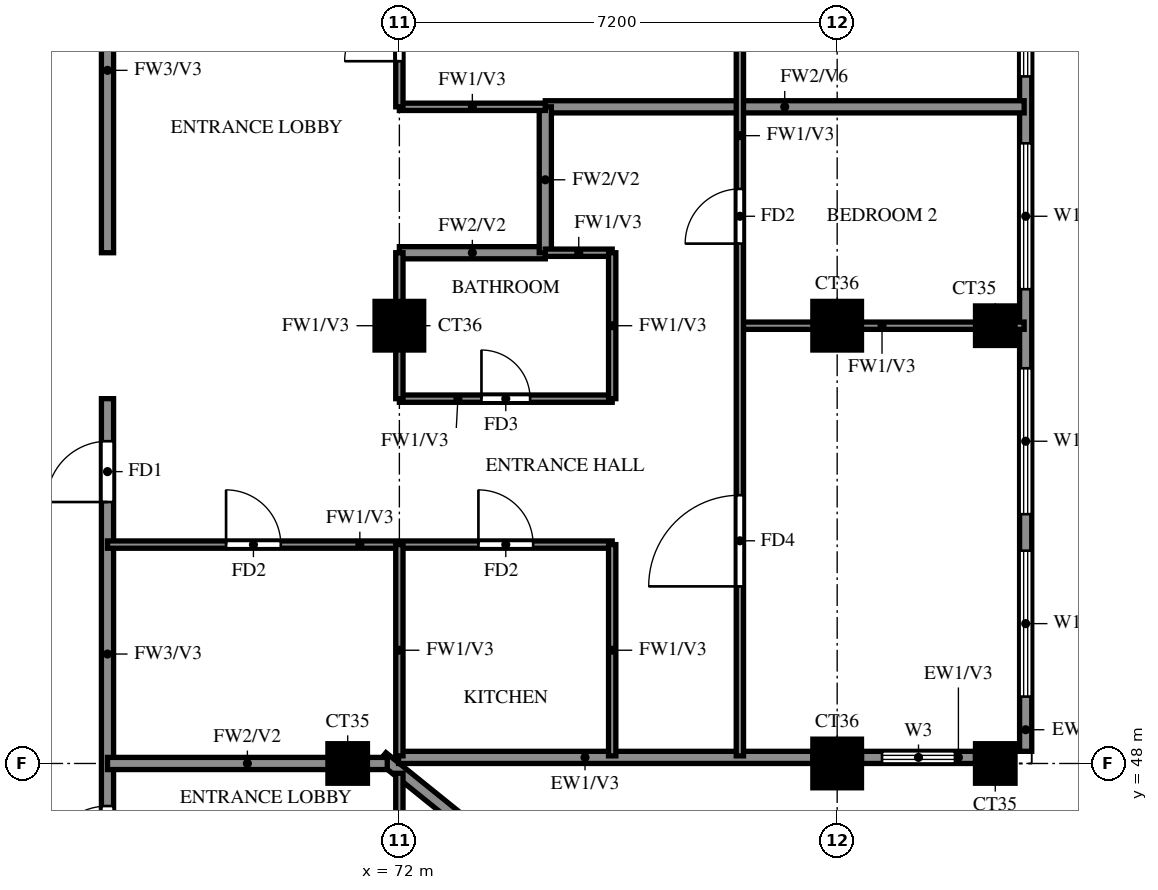
"""IFC4 building model, lengths in metres.
Left out: names, types, materials, properties, quantities, classifications, styles, units other than length and angle.
Written with IfcOpenShell. Run it as: python <this file> out.ifc"""

import sys

from ifc_helpers import new_model, si_unit, direction, frame, frame_2d, origin, origin_2d, place, context, subcontext, project, spatial, rectangle, extrude, source, transform, mapped, element, fill, save


model = new_model("IFC4")
c1 = context("Model", 3, precision=1e-05, world=origin(), true_north=direction((0.0, 1.0)))
c2 = subcontext(c1, "Body", "Model", "MODEL_VIEW")
j1 = project(units=[si_unit("LENGTHUNIT", "METRE"), si_unit("PLANEANGLEUNIT", "RADIAN")], contexts=[c1])
p1 = place(None, origin())
s1 = spatial("IfcSite", under=j1, at=p1, CompositionType="ELEMENT")
p2 = place(p1, origin())
s2 = spatial("IfcBuilding", under=s1, at=p2, CompositionType="ELEMENT")
p3 = place(p2, frame((0.0, 0.0, 250.0)))
s3 = spatial("IfcBuildingStorey", under=s2, at=p3, CompositionType="ELEMENT", Elevation=250.0)
m1 = source(origin(), c2, "Body", "SweptSolid", [
    extrude(rectangle(XDim=0.65, YDim=0.65, at=origin_2d()), origin(), (0.0, 0.0, 1.0), 3.22),
])
p4 = place(p3, frame((71.15, 48.0, 0.0), z_axis=(0.0, 0.0, 1.0), x_axis=(1.0, 0.0, 0.0)))
e1 = element("IfcColumn", 1, at=p4, inside=s3, PredefinedType="COLUMN", context=c2, shape_type="MappedRepresentation", body=[
    mapped(m1, transform((0.0, 0.0, 0.0))),
])
m2 = source(origin(), c2, "Body", "SweptSolid", [
    extrude(rectangle(XDim=0.8, YDim=0.8, at=origin_2d()), origin(), (0.0, 0.0, 1.0), 3.22),
])
p5 = place(p3, frame((79.2, 48.0, 0.0), z_axis=(0.0, 0.0, 1.0), x_axis=(1.0, 0.0, 0.0)))
e2 = element("IfcColumn", 2, at=p5, inside=s3, PredefinedType="COLUMN", context=c2, shape_type="MappedRepresentation", body=[
    mapped(m2, transform((0.0, 0.0, 0.0))),
])
p6 = place(p3, frame((81.8, 48.0, 0.0), z_axis=(0.0, 0.0, 1.0), x_axis=(1.0, 0.0, 0.0)))
e3 = element("IfcColumn", 3, at=p6, inside=s3, PredefinedType="COLUMN", context=c2, shape_type="MappedRepresentation", body=[
    mapped(m1, transform((0.0, 0.0, 0.0))),
])
for number, where, z_axis, x_axis in (
    (4, (72.0, 55.2, 0.0), (0.0, 0.0, 1.0), (1.0, 0.0, 0.0)),
    (5, (79.2, 55.2, 0.0), (0.0, 0.0, 1.0), (1.0, 0.0, 0.0)),
):
    element("IfcColumn", number, at=place(p3, frame(where, z_axis=z_axis, x_axis=x_axis)), inside=s3, PredefinedType="COLUMN", context=c2, shape_type="MappedRepresentation", body=[
        mapped(m2, transform((0.0, 0.0, 0.0))),
    ])
p7 = place(p3, frame((81.8, 55.2, 0.0), z_axis=(0.0, 0.0, 1.0), x_axis=(1.0, 0.0, 0.0)))
e6 = element("IfcColumn", 6, at=p7, inside=s3, PredefinedType="COLUMN", context=c2, shape_type="MappedRepresentation", body=[
    mapped(m1, transform((0.0, 0.0, 0.0))),
])
p8 = place(p3, frame((81.907, 39.87, 0.0), z_axis=(0.0, 0.0, 1.0), x_axis=(-0.777936274417, 0.62834318087, 0.0)))
e7 = element("IfcWall", 7, at=p8, inside=s3, PredefinedType="SOLIDWALL", context=c2, shape_type="SweptSolid", body=[
    extrude(rectangle(XDim=13.099, YDim=0.2, at=frame_2d((6.549, 0.0))), origin(), (0.0, 0.0, 1.0), 3.22),
])
p9 = place(p8, frame((9.938, 0.0, 1.5)))
e8 = element("IfcOpeningElement", 8, at=p9, cuts=e7, PredefinedType="OPENING", context=c2, shape_type="SweptSolid", body=[
    extrude(rectangle(XDim=0.9, YDim=0.9, at=frame_2d((0.45, 0.45))), frame((0.0, 0.11, 0.0), z_axis=(0.0, -1.0, 0.0), x_axis=(1.0, 0.0, 0.0)), (0.0, 0.0, 1.0), 0.22),
])
p10 = place(p3, frame((71.987, 48.1, 0.0), z_axis=(0.0, 0.0, 1.0), x_axis=(1.0, 0.0, 0.0)))
e9 = element("IfcWall", 9, at=p10, inside=s3, PredefinedType="SOLIDWALL", context=c2, shape_type="SweptSolid", body=[
    extrude(rectangle(XDim=6.813, YDim=0.2, at=frame_2d((3.406, 0.0))), origin(), (0.0, 0.0, 1.0), 3.22),
])
p11 = place(p3, frame((79.6, 48.1, 0.0), z_axis=(0.0, 0.0, 1.0), x_axis=(1.0, 0.0, 0.0)))
e10 = element("IfcWall", 10, at=p11, inside=s3, PredefinedType="SOLIDWALL", context=c2, shape_type="SweptSolid", body=[
    extrude(rectangle(XDim=1.875, YDim=0.2, at=frame_2d((0.938, 0.0))), origin(), (0.0, 0.0, 1.0), 3.22),
])
p12 = place(p11, frame((0.337, 0.0, 0.6)))
e11 = element("IfcOpeningElement", 11, at=p12, cuts=e10, PredefinedType="OPENING", context=c2, shape_type="SweptSolid", body=[
    extrude(rectangle(XDim=1.2, YDim=2.4, at=frame_2d((0.6, 1.2))), frame((0.0, 0.11, 0.0), z_axis=(0.0, -1.0, 0.0), x_axis=(1.0, 0.0, 0.0)), (0.0, 0.0, 1.0), 0.22),
])
p13 = place(p3, frame((82.3, 48.2, 0.0), z_axis=(0.0, 0.0, 1.0), x_axis=(0.0, 1.0, 0.0)))
e12 = element("IfcWall", 12, at=p13, inside=s3, PredefinedType="SOLIDWALL", context=c2, shape_type="SweptSolid", body=[
    extrude(rectangle(XDim=14.2, YDim=0.2, at=frame_2d((7.1, 0.0))), origin(), (0.0, 0.0, 1.0), 3.22),
])
p14 = place(p13, frame((0.9, 0.0, 0.6)))
e13 = element("IfcOpeningElement", 13, at=p14, cuts=e12, PredefinedType="OPENING", context=c2, shape_type="SweptSolid", body=[
    extrude(rectangle(XDim=2.4, YDim=2.4, at=frame_2d((1.2, 1.2))), frame((0.0, 0.11, 0.0), z_axis=(0.0, -1.0, 0.0), x_axis=(1.0, 0.0, 0.0)), (0.0, 0.0, 1.0), 0.22),
])
p15 = place(p13, frame((3.9, 0.0, 0.6)))
e14 = element("IfcOpeningElement", 14, at=p15, cuts=e12, PredefinedType="OPENING", context=c2, shape_type="SweptSolid", body=[
    extrude(rectangle(XDim=2.4, YDim=2.4, at=frame_2d((1.2, 1.2))), frame((0.0, 0.11, 0.0), z_axis=(0.0, -1.0, 0.0), x_axis=(1.0, 0.0, 0.0)), (0.0, 0.0, 1.0), 0.22),
])
p16 = place(p13, frame((7.6, 0.0, 0.6)))
e15 = element("IfcOpeningElement", 15, at=p16, cuts=e12, PredefinedType="OPENING", context=c2, shape_type="SweptSolid", body=[
    extrude(rectangle(XDim=2.4, YDim=2.4, at=frame_2d((1.2, 1.2))), frame((0.0, 0.11, 0.0), z_axis=(0.0, -1.0, 0.0), x_axis=(1.0, 0.0, 0.0)), (0.0, 0.0, 1.0), 0.22),
])
p17 = place(p13, frame((11.1, 0.0, 0.6)))
e16 = element("IfcOpeningElement", 16, at=p17, cuts=e12, PredefinedType="OPENING", context=c2, shape_type="SweptSolid", body=[
    extrude(rectangle(XDim=2.4, YDim=2.4, at=frame_2d((1.2, 1.2))), frame((0.0, 0.11, 0.0), z_axis=(0.0, -1.0, 0.0), x_axis=(1.0, 0.0, 0.0)), (0.0, 0.0, 1.0), 0.22),
])
p18 = place(p3, frame((67.2, 45.6, 0.0), z_axis=(0.0, 0.0, 1.0), x_axis=(0.0, 1.0, 0.0)))
e17 = element("IfcWall", 17, at=p18, inside=s3, PredefinedType="SOLIDWALL", context=c2, shape_type="SweptSolid", body=[
    extrude(rectangle(XDim=8.4, YDim=0.2, at=frame_2d((4.2, 0.0))), origin(), (0.0, 0.0, 1.0), 3.22),
])
p19 = place(p18, frame((6.7, 0.0, 0.0)))
e18 = element("IfcOpeningElement", 18, at=p19, cuts=e17, PredefinedType="OPENING", context=c2, shape_type="SweptSolid", body=[
    extrude(rectangle(XDim=1.0, YDim=2.1, at=frame_2d((0.5, 1.05))), frame((0.0, 0.11, 0.0), z_axis=(0.0, -1.0, 0.0), x_axis=(1.0, 0.0, 0.0)), (0.0, 0.0, 1.0), 0.22),
])
p20 = place(p18, frame((0.7, 0.0, 0.0)))
e19 = element("IfcOpeningElement", 19, at=p20, cuts=e17, PredefinedType="OPENING", context=c2, shape_type="SweptSolid", body=[
    extrude(rectangle(XDim=1.0, YDim=2.1, at=frame_2d((0.5, 1.05))), frame((0.0, 0.11, 0.0), z_axis=(0.0, -1.0, 0.0), x_axis=(1.0, 0.0, 0.0)), (0.0, 0.0, 1.0), 0.22),
])
p21 = place(p3, frame((67.2, 56.4, 0.0), z_axis=(0.0, 0.0, 1.0), x_axis=(0.0, 1.0, 0.0)))
e20 = element("IfcWall", 20, at=p21, inside=s3, PredefinedType="SOLIDWALL", context=c2, shape_type="SweptSolid", body=[
    extrude(rectangle(XDim=6.0, YDim=0.2, at=frame_2d((3.0, 0.0))), origin(), (0.0, 0.0, 1.0), 3.22),
])
p22 = place(p21, frame((3.7, 0.0, 0.0)))
e21 = element("IfcOpeningElement", 21, at=p22, cuts=e20, PredefinedType="OPENING", context=c2, shape_type="SweptSolid", body=[
    extrude(rectangle(XDim=1.0, YDim=2.1, at=frame_2d((0.5, 1.05))), frame((0.0, 0.11, 0.0), z_axis=(0.0, -1.0, 0.0), x_axis=(1.0, 0.0, 0.0)), (0.0, 0.0, 1.0), 0.22),
])
p23 = place(p3, frame((67.2, 48.0, 0.0), z_axis=(0.0, 0.0, 1.0), x_axis=(1.0, 0.0, 0.0)))
e22 = element("IfcWall", 22, at=p23, inside=s3, PredefinedType="SOLIDWALL", context=c2, shape_type="SweptSolid", body=[
    extrude(rectangle(XDim=4.601, YDim=0.2, at=frame_2d((2.301, 0.0))), origin(), (0.0, 0.0, 1.0), 3.22),
])
p24 = place(p3, frame((72.0, 56.4, 0.0), z_axis=(0.0, 0.0, 1.0), x_axis=(1.0, 0.0, 0.0)))
e23 = element("IfcWall", 23, at=p24, inside=s3, PredefinedType="SOLIDWALL", context=c2, shape_type="SweptSolid", body=[
    extrude(rectangle(XDim=2.4, YDim=0.2, at=frame_2d((1.2, 0.0))), origin(), (0.0, 0.0, 1.0), 3.22),
])
p25 = place(p3, frame((74.4, 58.8, 0.0), z_axis=(0.0, 0.0, 1.0), x_axis=(1.0, 0.0, 0.0)))
e24 = element("IfcWall", 24, at=p25, inside=s3, PredefinedType="SOLIDWALL", context=c2, shape_type="SweptSolid", body=[
    extrude(rectangle(XDim=7.875, YDim=0.2, at=frame_2d((3.938, 0.0))), origin(), (0.0, 0.0, 1.0), 2.32),
])
p26 = place(p3, frame((74.4, 56.4, 0.0), z_axis=(0.0, 0.0, 1.0), x_axis=(0.0, 1.0, 0.0)))
e25 = element("IfcWall", 25, at=p26, inside=s3, PredefinedType="SOLIDWALL", context=c2, shape_type="SweptSolid", body=[
    extrude(rectangle(XDim=2.4, YDim=0.2, at=frame_2d((1.2, 0.0))), origin(), (0.0, 0.0, 1.0), 3.22),
])
p27 = place(p3, frame((67.2, 51.6, 0.0), z_axis=(0.0, 0.0, 1.0), x_axis=(1.0, 0.0, 0.0)))
e26 = element("IfcWall", 26, at=p27, inside=s3, PredefinedType="PARTITIONING", context=c2, shape_type="SweptSolid", body=[
    extrude(rectangle(XDim=8.3, YDim=0.12, at=frame_2d((4.15, 0.0))), origin(), (0.0, 0.0, 1.0), 3.22),
])
p28 = place(p27, frame((6.1, 0.0, 0.0)))
e27 = element("IfcOpeningElement", 27, at=p28, cuts=e26, PredefinedType="OPENING", context=c2, shape_type="SweptSolid", body=[
    extrude(rectangle(XDim=0.9, YDim=2.1, at=frame_2d((0.45, 1.05))), frame((0.0, 0.07, 0.0), z_axis=(0.0, -1.0, 0.0), x_axis=(1.0, 0.0, 0.0)), (0.0, 0.0, 1.0), 0.14),
])
p29 = place(p27, frame((1.95, 0.0, 0.0)))
e28 = element("IfcOpeningElement", 28, at=p29, cuts=e26, PredefinedType="OPENING", context=c2, shape_type="SweptSolid", body=[
    extrude(rectangle(XDim=0.9, YDim=2.1, at=frame_2d((0.45, 1.05))), frame((0.0, 0.07, 0.0), z_axis=(0.0, -1.0, 0.0), x_axis=(1.0, 0.0, 0.0)), (0.0, 0.0, 1.0), 0.14),
])
p30 = place(p3, frame((72.0, 54.0, 0.0), z_axis=(0.0, 0.0, 1.0), x_axis=(1.0, 0.0, 0.0)))
e29 = element("IfcWall", 29, at=p30, inside=s3, PredefinedType="PARTITIONING", context=c2, shape_type="SweptSolid", body=[
    extrude(rectangle(XDim=3.5, YDim=0.12, at=frame_2d((1.75, 0.0))), origin(), (0.0, 0.0, 1.0), 3.22),
])
p31 = place(p30, frame((1.35, 0.0, 0.0)))
e30 = element("IfcOpeningElement", 30, at=p31, cuts=e29, PredefinedType="OPENING", context=c2, shape_type="SweptSolid", body=[
    extrude(rectangle(XDim=0.8, YDim=2.1, at=frame_2d((0.4, 1.05))), frame((0.0, 0.07, 0.0), z_axis=(0.0, -1.0, 0.0), x_axis=(1.0, 0.0, 0.0)), (0.0, 0.0, 1.0), 0.14),
])
p32 = place(p3, frame((77.6, 55.2, 0.0), z_axis=(0.0, 0.0, 1.0), x_axis=(1.0, 0.0, 0.0)))
e31 = element("IfcWall", 31, at=p32, inside=s3, PredefinedType="PARTITIONING", context=c2, shape_type="SweptSolid", body=[
    extrude(rectangle(XDim=4.675, YDim=0.12, at=frame_2d((2.337, 0.0))), origin(), (0.0, 0.0, 1.0), 3.22),
])
p33 = place(p3, frame((74.4, 56.4, 0.0), z_axis=(0.0, 0.0, 1.0), x_axis=(1.0, 0.0, 0.0)))
e32 = element("IfcWall", 32, at=p33, inside=s3, PredefinedType="PARTITIONING", context=c2, shape_type="SweptSolid", body=[
    extrude(rectangle(XDim=1.1, YDim=0.12, at=frame_2d((0.55, 0.0))), origin(), (0.0, 0.0, 1.0), 3.22),
])
p34 = place(p3, frame((72.0, 58.8, 0.0), z_axis=(0.0, 0.0, 1.0), x_axis=(1.0, 0.0, 0.0)))
e33 = element("IfcWall", 33, at=p34, inside=s3, PredefinedType="PARTITIONING", context=c2, shape_type="SweptSolid", body=[
    extrude(rectangle(XDim=2.4, YDim=0.12, at=frame_2d((1.2, 0.0))), origin(), (0.0, 0.0, 1.0), 3.22),
])
p35 = place(p3, frame((72.0, 39.725, 0.0), z_axis=(0.0, 0.0, 1.0), x_axis=(0.0, 1.0, 0.0)))
e34 = element("IfcWall", 34, at=p35, inside=s3, PredefinedType="PARTITIONING", context=c2, shape_type="SweptSolid", body=[
    extrude(rectangle(XDim=8.114, YDim=0.12, at=frame_2d((4.057, 0.0))), origin(), (0.0, 0.0, 1.0), 2.32),
])
p36 = place(p35, frame((1.788, 0.0, 0.0)))
e35 = element("IfcOpeningElement", 35, at=p36, cuts=e34, PredefinedType="OPENING", context=c2, shape_type="SweptSolid", body=[
    extrude(rectangle(XDim=0.9, YDim=2.1, at=frame_2d((0.45, 1.05))), frame((0.0, 0.07, 0.0), z_axis=(0.0, -1.0, 0.0), x_axis=(1.0, 0.0, 0.0)), (0.0, 0.0, 1.0), 0.14),
])
p37 = place(p35, frame((4.575, 0.0, 0.0)))
e36 = element("IfcOpeningElement", 36, at=p37, cuts=e34, PredefinedType="OPENING", context=c2, shape_type="SweptSolid", body=[
    extrude(rectangle(XDim=0.8, YDim=2.1, at=frame_2d((0.4, 1.05))), frame((0.0, 0.07, 0.0), z_axis=(0.0, -1.0, 0.0), x_axis=(1.0, 0.0, 0.0)), (0.0, 0.0, 1.0), 0.14),
])
p38 = place(p3, frame((72.0, 48.125, 0.0), z_axis=(0.0, 0.0, 1.0), x_axis=(0.0, 1.0, 0.0)))
e37 = element("IfcWall", 37, at=p38, inside=s3, PredefinedType="PARTITIONING", context=c2, shape_type="SweptSolid", body=[
    extrude(rectangle(XDim=3.475, YDim=0.12, at=frame_2d((1.738, 0.0))), origin(), (0.0, 0.0, 1.0), 3.22),
])
p39 = place(p3, frame((72.0, 54.0, 0.0), z_axis=(0.0, 0.0, 1.0), x_axis=(0.0, 1.0, 0.0)))
e38 = element("IfcWall", 38, at=p39, inside=s3, PredefinedType="PARTITIONING", context=c2, shape_type="SweptSolid", body=[
    extrude(rectangle(XDim=2.4, YDim=0.12, at=frame_2d((1.2, 0.0))), origin(), (0.0, 0.0, 1.0), 3.22),
])
p40 = place(p3, frame((72.0, 58.8, 0.0), z_axis=(0.0, 0.0, 1.0), x_axis=(0.0, 1.0, 0.0)))
e39 = element("IfcWall", 39, at=p40, inside=s3, PredefinedType="PARTITIONING", context=c2, shape_type="SweptSolid", body=[
    extrude(rectangle(XDim=3.6, YDim=0.12, at=frame_2d((1.8, 0.0))), origin(), (0.0, 0.0, 1.0), 3.22),
])
p41 = place(p40, frame((0.75, 0.0, 0.0)))
e40 = element("IfcOpeningElement", 40, at=p41, cuts=e39, PredefinedType="OPENING", context=c2, shape_type="SweptSolid", body=[
    extrude(rectangle(XDim=0.9, YDim=2.1, at=frame_2d((0.45, 1.05))), frame((0.0, 0.07, 0.0), z_axis=(0.0, -1.0, 0.0), x_axis=(1.0, 0.0, 0.0)), (0.0, 0.0, 1.0), 0.14),
])
p42 = place(p3, frame((75.5, 48.125, 0.0), z_axis=(0.0, 0.0, 1.0), x_axis=(0.0, 1.0, 0.0)))
e41 = element("IfcWall", 41, at=p42, inside=s3, PredefinedType="PARTITIONING", context=c2, shape_type="SweptSolid", body=[
    extrude(rectangle(XDim=3.475, YDim=0.12, at=frame_2d((1.738, 0.0))), origin(), (0.0, 0.0, 1.0), 3.22),
])
p43 = place(p3, frame((75.5, 54.0, 0.0), z_axis=(0.0, 0.0, 1.0), x_axis=(0.0, 1.0, 0.0)))
e42 = element("IfcWall", 42, at=p43, inside=s3, PredefinedType="PARTITIONING", context=c2, shape_type="SweptSolid", body=[
    extrude(rectangle(XDim=2.4, YDim=0.12, at=frame_2d((1.2, 0.0))), origin(), (0.0, 0.0, 1.0), 3.22),
])
p44 = place(p3, frame((77.6, 48.125, 0.0), z_axis=(0.0, 0.0, 1.0), x_axis=(0.0, 1.0, 0.0)))
e43 = element("IfcWall", 43, at=p44, inside=s3, PredefinedType="PARTITIONING", context=c2, shape_type="SweptSolid", body=[
    extrude(rectangle(XDim=21.475, YDim=0.12, at=frame_2d((10.738, 0.0))), origin(), (0.0, 0.0, 1.0), 3.22),
])
p45 = place(p44, frame((2.788, 0.0, 0.0)))
e44 = element("IfcOpeningElement", 44, at=p45, cuts=e43, PredefinedType="OPENING", context=c2, shape_type="SweptSolid", body=[
    extrude(rectangle(XDim=1.5, YDim=2.1, at=frame_2d((0.75, 1.05))), frame((0.0, 0.07, 0.0), z_axis=(0.0, -1.0, 0.0), x_axis=(1.0, 0.0, 0.0)), (0.0, 0.0, 1.0), 0.14),
])
p46 = place(p44, frame((8.425, 0.0, 0.0)))
e45 = element("IfcOpeningElement", 45, at=p46, cuts=e43, PredefinedType="OPENING", context=c2, shape_type="SweptSolid", body=[
    extrude(rectangle(XDim=0.9, YDim=2.1, at=frame_2d((0.45, 1.05))), frame((0.0, 0.07, 0.0), z_axis=(0.0, -1.0, 0.0), x_axis=(1.0, 0.0, 0.0)), (0.0, 0.0, 1.0), 0.14),
])
p47 = place(p44, frame((12.025, 0.0, 0.0)))
e46 = element("IfcOpeningElement", 46, at=p47, cuts=e43, PredefinedType="OPENING", context=c2, shape_type="SweptSolid", body=[
    extrude(rectangle(XDim=0.9, YDim=2.1, at=frame_2d((0.45, 1.05))), frame((0.0, 0.07, 0.0), z_axis=(0.0, -1.0, 0.0), x_axis=(1.0, 0.0, 0.0)), (0.0, 0.0, 1.0), 0.14),
])
p48 = place(p44, frame((17.425, 0.0, 0.0)))
e47 = element("IfcOpeningElement", 47, at=p48, cuts=e43, PredefinedType="OPENING", context=c2, shape_type="SweptSolid", body=[
    extrude(rectangle(XDim=0.9, YDim=2.1, at=frame_2d((0.45, 1.05))), frame((0.0, 0.07, 0.0), z_axis=(0.0, -1.0, 0.0), x_axis=(1.0, 0.0, 0.0)), (0.0, 0.0, 1.0), 0.14),
])
p49 = place(p12, origin())
e48 = element("IfcWindow", 48, at=p49, inside=s3, PartitioningType="SINGLE_PANEL", PredefinedType="WINDOW", context=c2, shape_type="SweptSolid", body=[
    extrude(rectangle(XDim=1.2, YDim=2.4, at=frame_2d((0.6, 1.2))), frame((0.0, 0.03, 0.0), z_axis=(0.0, -1.0, 0.0), x_axis=(1.0, 0.0, 0.0)), (0.0, 0.0, 1.0), 0.06),
])
fill(e11, e48)
p50 = place(p14, origin())
e49 = element("IfcWindow", 49, at=p50, inside=s3, PartitioningType="DOUBLE_PANEL_VERTICAL", PredefinedType="WINDOW", context=c2, shape_type="SweptSolid", body=[
    extrude(rectangle(XDim=2.4, YDim=2.4, at=frame_2d((1.2, 1.2))), frame((0.0, 0.03, 0.0), z_axis=(0.0, -1.0, 0.0), x_axis=(1.0, 0.0, 0.0)), (0.0, 0.0, 1.0), 0.06),
])
fill(e13, e49)
p51 = place(p15, origin())
e50 = element("IfcWindow", 50, at=p51, inside=s3, PartitioningType="DOUBLE_PANEL_VERTICAL", PredefinedType="WINDOW", context=c2, shape_type="SweptSolid", body=[
    extrude(rectangle(XDim=2.4, YDim=2.4, at=frame_2d((1.2, 1.2))), frame((0.0, 0.03, 0.0), z_axis=(0.0, -1.0, 0.0), x_axis=(1.0, 0.0, 0.0)), (0.0, 0.0, 1.0), 0.06),
])
fill(e14, e50)
p52 = place(p16, origin())
e51 = element("IfcWindow", 51, at=p52, inside=s3, PartitioningType="DOUBLE_PANEL_VERTICAL", PredefinedType="WINDOW", context=c2, shape_type="SweptSolid", body=[
    extrude(rectangle(XDim=2.4, YDim=2.4, at=frame_2d((1.2, 1.2))), frame((0.0, 0.03, 0.0), z_axis=(0.0, -1.0, 0.0), x_axis=(1.0, 0.0, 0.0)), (0.0, 0.0, 1.0), 0.06),
])
fill(e15, e51)
p53 = place(p17, origin())
e52 = element("IfcWindow", 52, at=p53, inside=s3, PartitioningType="DOUBLE_PANEL_VERTICAL", PredefinedType="WINDOW", context=c2, shape_type="SweptSolid", body=[
    extrude(rectangle(XDim=2.4, YDim=2.4, at=frame_2d((1.2, 1.2))), frame((0.0, 0.03, 0.0), z_axis=(0.0, -1.0, 0.0), x_axis=(1.0, 0.0, 0.0)), (0.0, 0.0, 1.0), 0.06),
])
fill(e16, e52)
p54 = place(p19, origin())
e53 = element("IfcDoor", 53, at=p54, inside=s3, OperationType="SINGLE_SWING_LEFT", PredefinedType="DOOR", context=c2, shape_type="SweptSolid", body=[
    extrude(rectangle(XDim=1.0, YDim=2.1, at=frame_2d((0.5, 1.05))), frame((0.0, 0.025, 0.0), z_axis=(0.0, -1.0, 0.0), x_axis=(1.0, 0.0, 0.0)), (0.0, 0.0, 1.0), 0.05),
])
fill(e18, e53)
p55 = place(p45, origin())
e54 = element("IfcDoor", 54, at=p55, inside=s3, OperationType="SINGLE_SWING_RIGHT", PredefinedType="DOOR", context=c2, shape_type="SweptSolid", body=[
    extrude(rectangle(XDim=1.5, YDim=2.1, at=frame_2d((0.75, 1.05))), frame((0.0, 0.025, 0.0), z_axis=(0.0, -1.0, 0.0), x_axis=(1.0, 0.0, 0.0)), (0.0, 0.0, 1.0), 0.05),
])
fill(e44, e54)
p56 = place(p46, origin())
e55 = element("IfcDoor", 55, at=p56, inside=s3, OperationType="SINGLE_SWING_LEFT", PredefinedType="DOOR", context=c2, shape_type="SweptSolid", body=[
    extrude(rectangle(XDim=0.9, YDim=2.1, at=frame_2d((0.45, 1.05))), frame((0.0, 0.025, 0.0), z_axis=(0.0, -1.0, 0.0), x_axis=(1.0, 0.0, 0.0)), (0.0, 0.0, 1.0), 0.05),
])
fill(e45, e55)
p57 = place(p28, origin())
e56 = element("IfcDoor", 56, at=p57, inside=s3, OperationType="SINGLE_SWING_LEFT", PredefinedType="DOOR", context=c2, shape_type="SweptSolid", body=[
    extrude(rectangle(XDim=0.9, YDim=2.1, at=frame_2d((0.45, 1.05))), frame((0.0, 0.025, 0.0), z_axis=(0.0, -1.0, 0.0), x_axis=(1.0, 0.0, 0.0)), (0.0, 0.0, 1.0), 0.05),
])
fill(e27, e56)
p58 = place(p31, origin())
e57 = element("IfcDoor", 57, at=p58, inside=s3, OperationType="SINGLE_SWING_RIGHT", PredefinedType="DOOR", context=c2, shape_type="SweptSolid", body=[
    extrude(rectangle(XDim=0.8, YDim=2.1, at=frame_2d((0.4, 1.05))), frame((0.0, 0.025, 0.0), z_axis=(0.0, -1.0, 0.0), x_axis=(1.0, 0.0, 0.0)), (0.0, 0.0, 1.0), 0.05),
])
fill(e30, e57)
p59 = place(p29, origin())
e58 = element("IfcDoor", 58, at=p59, inside=s3, OperationType="SINGLE_SWING_LEFT", PredefinedType="DOOR", context=c2, shape_type="SweptSolid", body=[
    extrude(rectangle(XDim=0.9, YDim=2.1, at=frame_2d((0.45, 1.05))), frame((0.0, 0.025, 0.0), z_axis=(0.0, -1.0, 0.0), x_axis=(1.0, 0.0, 0.0)), (0.0, 0.0, 1.0), 0.05),
])
fill(e28, e58)
p60 = place(p41, origin())
e59 = element("IfcDoor", 59, at=p60, inside=s3, OperationType="SINGLE_SWING_LEFT", PredefinedType="DOOR", context=c2, shape_type="SweptSolid", body=[
    extrude(rectangle(XDim=0.9, YDim=2.1, at=frame_2d((0.45, 1.05))), frame((0.0, 0.025, 0.0), z_axis=(0.0, -1.0, 0.0), x_axis=(1.0, 0.0, 0.0)), (0.0, 0.0, 1.0), 0.05),
])
fill(e40, e59)
p61 = place(p20, origin())
e60 = element("IfcDoor", 60, at=p61, inside=s3, OperationType="SINGLE_SWING_RIGHT", PredefinedType="DOOR", context=c2, shape_type="SweptSolid", body=[
    extrude(rectangle(XDim=1.0, YDim=2.1, at=frame_2d((0.5, 1.05))), frame((0.0, 0.025, 0.0), z_axis=(0.0, -1.0, 0.0), x_axis=(1.0, 0.0, 0.0)), (0.0, 0.0, 1.0), 0.05),
])
fill(e19, e60)
save(model, sys.argv[1])
